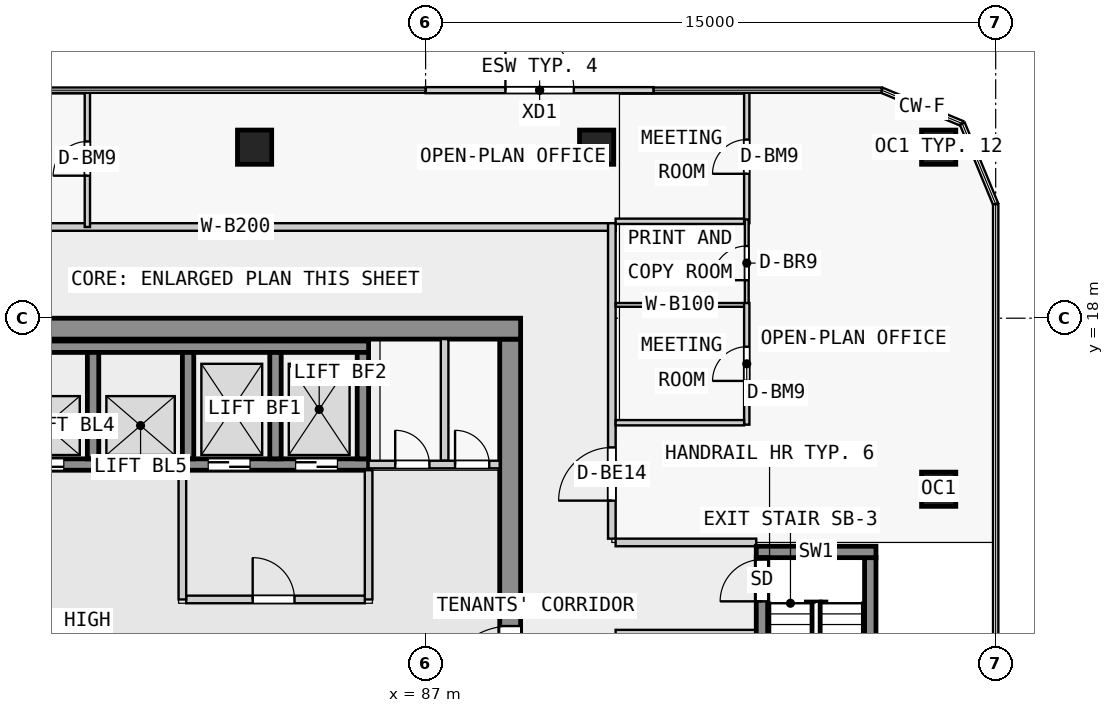
"""IFC4 building model, lengths in metres.
Left out: names, types, materials, properties, quantities, classifications, styles, units other than length and angle.
Written with IfcOpenShell. Run it as: python <this file> out.ifc"""

import sys

from ifc_helpers import new_model, si_unit, direction, frame, frame_2d, origin, origin_2d, place, context, subcontext, project, spatial, rectangle, extrude, element, fill, save


model = new_model("IFC4")
c1 = context("Model", 3, precision=1e-05, world=origin(), true_north=direction((0.0, 1.0)))
c2 = subcontext(c1, "Body", "Model", "MODEL_VIEW")
j1 = project(units=[si_unit("LENGTHUNIT", "METRE"), si_unit("PLANEANGLEUNIT", "RADIAN")], contexts=[c1])
p1 = place(None, origin())
s1 = spatial("IfcSite", under=j1, at=p1, CompositionType="ELEMENT")
p2 = place(p1, origin())
s2 = spatial("IfcBuilding", under=s1, at=p2, CompositionType="ELEMENT")
p3 = place(p2, frame((0.0, 0.0, 26.8)))
s3 = spatial("IfcBuildingStorey", under=s2, at=p3, CompositionType="ELEMENT", Elevation=26.8)
for number, where, z_axis, x_axis in (
    (1, (100.5, 13.5, 0.0), (0.0, 0.0, 1.0), (1.0, 0.0, 0.0)),
    (2, (100.5, 22.5, 0.0), (0.0, 0.0, 1.0), (1.0, 0.0, 0.0)),
    (3, (91.5, 22.5, 0.0), (0.0, 0.0, 1.0), (1.0, 0.0, 0.0)),
    (4, (82.5, 22.5, 0.0), (0.0, 0.0, 1.0), (1.0, 0.0, 0.0)),
):
    element("IfcColumn", number, at=place(p3, frame(where, z_axis=z_axis, x_axis=x_axis)), inside=s3, PredefinedType="COLUMN", context=c2, shape_type="SweptSolid", body=[
        extrude(rectangle(XDim=0.9, YDim=0.9, at=origin_2d()), origin(), (0.0, 0.0, 1.0), 3.5),
    ])
p4 = place(p3, frame((75.0, 17.725, 0.0), z_axis=(0.0, 0.0, 1.0), x_axis=(1.0, 0.0, 0.0)))
e5 = element("IfcWall", 5, at=p4, inside=s3, PredefinedType="SHEAR", context=c2, shape_type="SweptSolid", body=[
    extrude(rectangle(XDim=14.5, YDim=0.55, at=frame_2d((7.25, 0.0))), origin(), (0.0, 0.0, 1.0), 3.25),
])
p5 = place(p3, frame((89.225, 0.55, 0.0), z_axis=(0.0, 0.0, 1.0), x_axis=(0.0, 1.0, 0.0)))
e6 = element("IfcWall", 6, at=p5, inside=s3, PredefinedType="SHEAR", context=c2, shape_type="SweptSolid", body=[
    extrude(rectangle(XDim=16.9, YDim=0.55, at=frame_2d((8.45, 0.0))), origin(), (0.0, 0.0, 1.0), 3.25),
])
p6 = place(p5, frame((7.55, 0.0, 0.0)))
e7 = element("IfcOpeningElement", 7, at=p6, cuts=e6, PredefinedType="OPENING", context=c2, shape_type="SweptSolid", body=[
    extrude(rectangle(XDim=1.8, YDim=2.1, at=frame_2d((0.9, 1.05))), frame((0.0, 0.285, 0.0), z_axis=(0.0, -1.0, 0.0), x_axis=(1.0, 0.0, 0.0)), (0.0, 0.0, 1.0), 0.57),
])
p7 = place(p3, frame((75.53, 17.25, 0.0), z_axis=(0.0, 0.0, 1.0), x_axis=(1.0, 0.0, 0.0)))
e8 = element("IfcWall", 8, at=p7, inside=s3, PredefinedType="SHEAR", context=c2, shape_type="SweptSolid", body=[
    extrude(rectangle(XDim=9.97, YDim=0.3, at=frame_2d((4.985, 0.0))), origin(), (0.0, 0.0, 1.0), 3.25),
])
p8 = place(p3, frame((75.53, 14.15, 0.0), z_axis=(0.0, 0.0, 1.0), x_axis=(1.0, 0.0, 0.0)))
e9 = element("IfcWall", 9, at=p8, inside=s3, PredefinedType="SHEAR", context=c2, shape_type="SweptSolid", body=[
    extrude(rectangle(XDim=9.97, YDim=0.3, at=frame_2d((4.985, 0.0))), origin(), (0.0, 0.0, 1.0), 3.25),
])
p9 = place(p8, frame((0.85, 0.0, 0.0)))
e10 = element("IfcOpeningElement", 10, at=p9, cuts=e9, PredefinedType="OPENING", context=c2, shape_type="SweptSolid", body=[
    extrude(rectangle(XDim=1.1, YDim=2.1, at=frame_2d((0.55, 1.05))), frame((0.0, 0.16, 0.0), z_axis=(0.0, -1.0, 0.0), x_axis=(1.0, 0.0, 0.0)), (0.0, 0.0, 1.0), 0.32),
])
p10 = place(p8, frame((3.35, 0.0, 0.0)))
e11 = element("IfcOpeningElement", 11, at=p10, cuts=e9, PredefinedType="OPENING", context=c2, shape_type="SweptSolid", body=[
    extrude(rectangle(XDim=1.1, YDim=2.1, at=frame_2d((0.55, 1.05))), frame((0.0, 0.16, 0.0), z_axis=(0.0, -1.0, 0.0), x_axis=(1.0, 0.0, 0.0)), (0.0, 0.0, 1.0), 0.32),
])
p11 = place(p8, frame((5.75, 0.0, 0.0)))
e12 = element("IfcOpeningElement", 12, at=p11, cuts=e9, PredefinedType="OPENING", context=c2, shape_type="SweptSolid", body=[
    extrude(rectangle(XDim=1.1, YDim=2.1, at=frame_2d((0.55, 1.05))), frame((0.0, 0.16, 0.0), z_axis=(0.0, -1.0, 0.0), x_axis=(1.0, 0.0, 0.0)), (0.0, 0.0, 1.0), 0.32),
])
p12 = place(p8, frame((8.05, 0.0, 0.0)))
e13 = element("IfcOpeningElement", 13, at=p12, cuts=e9, PredefinedType="OPENING", context=c2, shape_type="SweptSolid", body=[
    extrude(rectangle(XDim=1.1, YDim=2.1, at=frame_2d((0.55, 1.05))), frame((0.0, 0.16, 0.0), z_axis=(0.0, -1.0, 0.0), x_axis=(1.0, 0.0, 0.0)), (0.0, 0.0, 1.0), 0.32),
])
for number, where, z_axis, x_axis in (
    (14, (78.25, 14.3, 0.0), (0.0, 0.0, 1.0), (0.0, 1.0, 0.0)),
    (15, (80.75, 14.3, 0.0), (0.0, 0.0, 1.0), (0.0, 1.0, 0.0)),
    (16, (83.05, 14.3, 0.0), (0.0, 0.0, 1.0), (0.0, 1.0, 0.0)),
    (17, (85.35, 14.3, 0.0), (0.0, 0.0, 1.0), (0.0, 1.0, 0.0)),
):
    element("IfcWall", number, at=place(p3, frame(where, z_axis=z_axis, x_axis=x_axis)), inside=s3, PredefinedType="SHEAR", context=c2, shape_type="SweptSolid", body=[
        extrude(rectangle(XDim=2.8, YDim=0.3, at=frame_2d((1.4, 0.0))), origin(), (0.0, 0.0, 1.0), 3.25),
    ])
p13 = place(p3, frame((95.85, 5.3, 0.0), z_axis=(0.0, 0.0, 1.0), x_axis=(0.0, 1.0, 0.0)))
e18 = element("IfcWall", 18, at=p13, inside=s3, PredefinedType="SHEAR", context=c2, shape_type="SweptSolid", body=[
    extrude(rectangle(XDim=6.4, YDim=0.3, at=frame_2d((3.2, 0.0))), origin(), (0.0, 0.0, 1.0), 3.25),
])
p14 = place(p13, frame((5.25, 0.0, 0.0)))
e19 = element("IfcOpeningElement", 19, at=p14, cuts=e18, PredefinedType="OPENING", context=c2, shape_type="SweptSolid", body=[
    extrude(rectangle(XDim=1.1, YDim=2.1, at=frame_2d((0.55, 1.05))), frame((0.0, 0.16, 0.0), z_axis=(0.0, -1.0, 0.0), x_axis=(1.0, 0.0, 0.0)), (0.0, 0.0, 1.0), 0.32),
])
p15 = place(p3, frame((98.7, 5.3, 0.0), z_axis=(0.0, 0.0, 1.0), x_axis=(0.0, 1.0, 0.0)))
e20 = element("IfcWall", 20, at=p15, inside=s3, PredefinedType="SHEAR", context=c2, shape_type="SweptSolid", body=[
    extrude(rectangle(XDim=6.4, YDim=0.3, at=frame_2d((3.2, 0.0))), origin(), (0.0, 0.0, 1.0), 3.25),
])
p16 = place(p3, frame((95.7, 11.85, 0.0), z_axis=(0.0, 0.0, 1.0), x_axis=(1.0, 0.0, 0.0)))
e21 = element("IfcWall", 21, at=p16, inside=s3, PredefinedType="SHEAR", context=c2, shape_type="SweptSolid", body=[
    extrude(rectangle(XDim=3.15, YDim=0.3, at=frame_2d((1.575, 0.0))), origin(), (0.0, 0.0, 1.0), 3.25),
])
p17 = place(p3, frame((87.0, 24.0, 0.0), z_axis=(0.0, 0.0, 1.0), x_axis=(1.0, 0.0, 0.0)))
e22 = element("IfcWall", 22, at=p17, inside=s3, PredefinedType="STANDARD", context=c2, shape_type="SweptSolid", body=[
    extrude(rectangle(XDim=6.0, YDim=0.16, at=frame_2d((3.0, 0.0))), origin(), (0.0, 0.0, 1.0), 3.25),
])
p18 = place(p17, frame((2.1, 0.0, 0.0)))
e23 = element("IfcOpeningElement", 23, at=p18, cuts=e22, PredefinedType="OPENING", context=c2, shape_type="SweptSolid", body=[
    extrude(rectangle(XDim=1.8, YDim=2.4, at=frame_2d((0.9, 1.2))), frame((0.0, 0.09, 0.0), z_axis=(0.0, -1.0, 0.0), x_axis=(1.0, 0.0, 0.0)), (0.0, 0.0, 1.0), 0.18),
])
p19 = place(p3, frame((80.6, 10.6, 0.0), z_axis=(0.0, 0.0, 1.0), x_axis=(0.0, 1.0, 0.0)))
e24 = element("IfcWall", 24, at=p19, inside=s3, PredefinedType="PARTITIONING", context=c2, shape_type="SweptSolid", body=[
    extrude(rectangle(XDim=3.4, YDim=0.2, at=frame_2d((1.7, 0.0))), origin(), (0.0, 0.0, 1.0), 3.25),
])
p20 = place(p3, frame((80.7, 10.6, 0.0), z_axis=(0.0, 0.0, 1.0), x_axis=(1.0, 0.0, 0.0)))
e25 = element("IfcWall", 25, at=p20, inside=s3, PredefinedType="PARTITIONING", context=c2, shape_type="SweptSolid", body=[
    extrude(rectangle(XDim=4.7, YDim=0.2, at=frame_2d((2.35, 0.0))), origin(), (0.0, 0.0, 1.0), 3.25),
])
p21 = place(p20, frame((1.75, 0.0, 0.0)))
e26 = element("IfcOpeningElement", 26, at=p21, cuts=e25, PredefinedType="OPENING", context=c2, shape_type="SweptSolid", body=[
    extrude(rectangle(XDim=1.1, YDim=2.1, at=frame_2d((0.55, 1.05))), frame((0.0, 0.11, 0.0), z_axis=(0.0, -1.0, 0.0), x_axis=(1.0, 0.0, 0.0)), (0.0, 0.0, 1.0), 0.22),
])
p22 = place(p3, frame((85.5, 10.6, 0.0), z_axis=(0.0, 0.0, 1.0), x_axis=(0.0, 1.0, 0.0)))
e27 = element("IfcWall", 27, at=p22, inside=s3, PredefinedType="PARTITIONING", context=c2, shape_type="SweptSolid", body=[
    extrude(rectangle(XDim=3.4, YDim=0.2, at=frame_2d((1.7, 0.0))), origin(), (0.0, 0.0, 1.0), 3.25),
])
p23 = place(p3, frame((85.5, 14.15, 0.0), z_axis=(0.0, 0.0, 1.0), x_axis=(1.0, 0.0, 0.0)))
e28 = element("IfcWall", 28, at=p23, inside=s3, PredefinedType="PARTITIONING", context=c2, shape_type="SweptSolid", body=[
    extrude(rectangle(XDim=3.45, YDim=0.2, at=frame_2d((1.725, 0.0))), origin(), (0.0, 0.0, 1.0), 3.25),
])
p24 = place(p23, frame((0.7, 0.0, 0.0)))
e29 = element("IfcOpeningElement", 29, at=p24, cuts=e28, PredefinedType="OPENING", context=c2, shape_type="SweptSolid", body=[
    extrude(rectangle(XDim=0.9, YDim=2.1, at=frame_2d((0.45, 1.05))), frame((0.0, 0.11, 0.0), z_axis=(0.0, -1.0, 0.0), x_axis=(1.0, 0.0, 0.0)), (0.0, 0.0, 1.0), 0.22),
])
p25 = place(p23, frame((2.275, 0.0, 0.0)))
e30 = element("IfcOpeningElement", 30, at=p25, cuts=e28, PredefinedType="OPENING", context=c2, shape_type="SweptSolid", body=[
    extrude(rectangle(XDim=0.9, YDim=2.1, at=frame_2d((0.45, 1.05))), frame((0.0, 0.11, 0.0), z_axis=(0.0, -1.0, 0.0), x_axis=(1.0, 0.0, 0.0)), (0.0, 0.0, 1.0), 0.22),
])
p26 = place(p3, frame((87.5, 14.25, 0.0), z_axis=(0.0, 0.0, 1.0), x_axis=(0.0, 1.0, 0.0)))
e31 = element("IfcWall", 31, at=p26, inside=s3, PredefinedType="PARTITIONING", context=c2, shape_type="SweptSolid", body=[
    extrude(rectangle(XDim=3.2, YDim=0.2, at=frame_2d((1.6, 0.0))), origin(), (0.0, 0.0, 1.0), 3.25),
])
p27 = place(p3, frame((72.0, 20.4, 0.0), z_axis=(0.0, 0.0, 1.0), x_axis=(1.0, 0.0, 0.0)))
e32 = element("IfcWall", 32, at=p27, inside=s3, PredefinedType="PARTITIONING", context=c2, shape_type="SweptSolid", body=[
    extrude(rectangle(XDim=20.0, YDim=0.2, at=frame_2d((10.0, 0.0))), origin(), (0.0, 0.0, 1.0), 3.25),
])
p28 = place(p3, frame((91.9, 12.2, 0.0), z_axis=(0.0, 0.0, 1.0), x_axis=(0.0, 1.0, 0.0)))
e33 = element("IfcWall", 33, at=p28, inside=s3, PredefinedType="PARTITIONING", context=c2, shape_type="SweptSolid", body=[
    extrude(rectangle(XDim=8.3, YDim=0.2, at=frame_2d((4.15, 0.0))), origin(), (0.0, 0.0, 1.0), 3.25),
])
p29 = place(p28, frame((1.0, 0.0, 0.0)))
e34 = element("IfcOpeningElement", 34, at=p29, cuts=e33, PredefinedType="OPENING", context=c2, shape_type="SweptSolid", body=[
    extrude(rectangle(XDim=1.4, YDim=2.4, at=frame_2d((0.7, 1.2))), frame((0.0, 0.11, 0.0), z_axis=(0.0, -1.0, 0.0), x_axis=(1.0, 0.0, 0.0)), (0.0, 0.0, 1.0), 0.22),
])
for number, where, z_axis, x_axis in (
    (35, (92.0, 9.7, 0.0), (0.0, 0.0, 1.0), (1.0, 0.0, 0.0)),
    (36, (92.0, 12.1, 0.0), (0.0, 0.0, 1.0), (1.0, 0.0, 0.0)),
):
    element("IfcWall", number, at=place(p3, frame(where, z_axis=z_axis, x_axis=x_axis)), inside=s3, PredefinedType="PARTITIONING", context=c2, shape_type="SweptSolid", body=[
        extrude(rectangle(XDim=3.7, YDim=0.2, at=frame_2d((1.85, 0.0))), origin(), (0.0, 0.0, 1.0), 3.25),
    ])
p30 = place(p3, frame((95.45, 20.5, 0.0), z_axis=(0.0, 0.0, 1.0), x_axis=(0.0, 1.0, 0.0)))
e37 = element("IfcWall", 37, at=p30, inside=s3, PredefinedType="PARTITIONING", context=c2, shape_type="SweptSolid", body=[
    extrude(rectangle(XDim=3.5, YDim=0.14, at=frame_2d((1.75, 0.0))), origin(), (0.0, 0.0, 1.0), 3.25),
])
p31 = place(p30, frame((1.3, 0.0, 0.0)))
e38 = element("IfcOpeningElement", 38, at=p31, cuts=e37, PredefinedType="OPENING", context=c2, shape_type="SweptSolid", body=[
    extrude(rectangle(XDim=0.9, YDim=2.4, at=frame_2d((0.45, 1.2))), frame((0.0, 0.08, 0.0), z_axis=(0.0, -1.0, 0.0), x_axis=(1.0, 0.0, 0.0)), (0.0, 0.0, 1.0), 0.16),
])
p32 = place(p3, frame((92.0, 20.55, 0.0), z_axis=(0.0, 0.0, 1.0), x_axis=(1.0, 0.0, 0.0)))
e39 = element("IfcWall", 39, at=p32, inside=s3, PredefinedType="PARTITIONING", context=c2, shape_type="SweptSolid", body=[
    extrude(rectangle(XDim=3.38, YDim=0.14, at=frame_2d((1.69, 0.0))), origin(), (0.0, 0.0, 1.0), 3.25),
])
p33 = place(p3, frame((95.45, 18.3, 0.0), z_axis=(0.0, 0.0, 1.0), x_axis=(0.0, 1.0, 0.0)))
e40 = element("IfcWall", 40, at=p33, inside=s3, PredefinedType="PARTITIONING", context=c2, shape_type="SweptSolid", body=[
    extrude(rectangle(XDim=2.3, YDim=0.1, at=frame_2d((1.15, 0.0))), origin(), (0.0, 0.0, 1.0), 3.25),
])
p34 = place(p33, frame((0.7, 0.0, 0.0)))
e41 = element("IfcOpeningElement", 41, at=p34, cuts=e40, PredefinedType="OPENING", context=c2, shape_type="SweptSolid", body=[
    extrude(rectangle(XDim=0.9, YDim=2.1, at=frame_2d((0.45, 1.05))), frame((0.0, 0.06, 0.0), z_axis=(0.0, -1.0, 0.0), x_axis=(1.0, 0.0, 0.0)), (0.0, 0.0, 1.0), 0.12),
])
p35 = place(p3, frame((92.0, 18.35, 0.0), z_axis=(0.0, 0.0, 1.0), x_axis=(1.0, 0.0, 0.0)))
e42 = element("IfcWall", 42, at=p35, inside=s3, PredefinedType="PARTITIONING", context=c2, shape_type="SweptSolid", body=[
    extrude(rectangle(XDim=3.4, YDim=0.1, at=frame_2d((1.7, 0.0))), origin(), (0.0, 0.0, 1.0), 3.25),
])
p36 = place(p3, frame((95.45, 15.2, 0.0), z_axis=(0.0, 0.0, 1.0), x_axis=(0.0, 1.0, 0.0)))
e43 = element("IfcWall", 43, at=p36, inside=s3, PredefinedType="PARTITIONING", context=c2, shape_type="SweptSolid", body=[
    extrude(rectangle(XDim=3.2, YDim=0.14, at=frame_2d((1.6, 0.0))), origin(), (0.0, 0.0, 1.0), 3.25),
])
p37 = place(p36, frame((1.15, 0.0, 0.0)))
e44 = element("IfcOpeningElement", 44, at=p37, cuts=e43, PredefinedType="OPENING", context=c2, shape_type="SweptSolid", body=[
    extrude(rectangle(XDim=0.9, YDim=2.4, at=frame_2d((0.45, 1.2))), frame((0.0, 0.08, 0.0), z_axis=(0.0, -1.0, 0.0), x_axis=(1.0, 0.0, 0.0)), (0.0, 0.0, 1.0), 0.16),
])
p38 = place(p3, frame((92.0, 15.25, 0.0), z_axis=(0.0, 0.0, 1.0), x_axis=(1.0, 0.0, 0.0)))
e45 = element("IfcWall", 45, at=p38, inside=s3, PredefinedType="PARTITIONING", context=c2, shape_type="SweptSolid", body=[
    extrude(rectangle(XDim=3.38, YDim=0.14, at=frame_2d((1.69, 0.0))), origin(), (0.0, 0.0, 1.0), 3.25),
])
p39 = place(p3, frame((78.1, 20.4, 0.0), z_axis=(0.0, 0.0, 1.0), x_axis=(0.0, 1.0, 0.0)))
e46 = element("IfcWall", 46, at=p39, inside=s3, PredefinedType="PARTITIONING", context=c2, shape_type="SweptSolid", body=[
    extrude(rectangle(XDim=3.6, YDim=0.14, at=frame_2d((1.8, 0.0))), origin(), (0.0, 0.0, 1.0), 3.25),
])
p40 = place(p39, frame((1.35, 0.0, 0.0)))
e47 = element("IfcOpeningElement", 47, at=p40, cuts=e46, PredefinedType="OPENING", context=c2, shape_type="SweptSolid", body=[
    extrude(rectangle(XDim=0.9, YDim=2.4, at=frame_2d((0.45, 1.2))), frame((0.0, 0.08, 0.0), z_axis=(0.0, -1.0, 0.0), x_axis=(1.0, 0.0, 0.0)), (0.0, 0.0, 1.0), 0.16),
])
p41 = place(p18, origin())
e48 = element("IfcDoor", 48, at=p41, inside=s3, OperationType="SINGLE_SWING_LEFT", PredefinedType="DOOR", context=c2, shape_type="SweptSolid", body=[
    extrude(rectangle(XDim=1.8, YDim=2.4, at=frame_2d((0.9, 1.2))), frame((0.0, 0.025, 0.0), z_axis=(0.0, -1.0, 0.0), x_axis=(1.0, 0.0, 0.0)), (0.0, 0.0, 1.0), 0.05),
])
fill(e23, e48)
p42 = place(p21, origin())
e49 = element("IfcDoor", 49, at=p42, inside=s3, OperationType="SINGLE_SWING_LEFT", PredefinedType="DOOR", context=c2, shape_type="SweptSolid", body=[
    extrude(rectangle(XDim=1.1, YDim=2.1, at=frame_2d((0.55, 1.05))), frame((0.0, 0.025, 0.0), z_axis=(0.0, -1.0, 0.0), x_axis=(1.0, 0.0, 0.0)), (0.0, 0.0, 1.0), 0.05),
])
fill(e26, e49)
p43 = place(p9, origin())
e50 = element("IfcDoor", 50, at=p43, inside=s3, OperationType="DOUBLE_DOOR_SLIDING", PredefinedType="DOOR", context=c2, shape_type="SweptSolid", body=[
    extrude(rectangle(XDim=1.1, YDim=2.1, at=frame_2d((0.55, 1.05))), frame((0.0, 0.025, 0.0), z_axis=(0.0, -1.0, 0.0), x_axis=(1.0, 0.0, 0.0)), (0.0, 0.0, 1.0), 0.05),
])
fill(e10, e50)
p44 = place(p10, origin())
e51 = element("IfcDoor", 51, at=p44, inside=s3, OperationType="DOUBLE_DOOR_SLIDING", PredefinedType="DOOR", context=c2, shape_type="SweptSolid", body=[
    extrude(rectangle(XDim=1.1, YDim=2.1, at=frame_2d((0.55, 1.05))), frame((0.0, 0.025, 0.0), z_axis=(0.0, -1.0, 0.0), x_axis=(1.0, 0.0, 0.0)), (0.0, 0.0, 1.0), 0.05),
])
fill(e11, e51)
p45 = place(p11, origin())
e52 = element("IfcDoor", 52, at=p45, inside=s3, OperationType="DOUBLE_DOOR_SLIDING", PredefinedType="DOOR", context=c2, shape_type="SweptSolid", body=[
    extrude(rectangle(XDim=1.1, YDim=2.1, at=frame_2d((0.55, 1.05))), frame((0.0, 0.025, 0.0), z_axis=(0.0, -1.0, 0.0), x_axis=(1.0, 0.0, 0.0)), (0.0, 0.0, 1.0), 0.05),
])
fill(e12, e52)
p46 = place(p12, origin())
e53 = element("IfcDoor", 53, at=p46, inside=s3, OperationType="DOUBLE_DOOR_SLIDING", PredefinedType="DOOR", context=c2, shape_type="SweptSolid", body=[
    extrude(rectangle(XDim=1.1, YDim=2.1, at=frame_2d((0.55, 1.05))), frame((0.0, 0.025, 0.0), z_axis=(0.0, -1.0, 0.0), x_axis=(1.0, 0.0, 0.0)), (0.0, 0.0, 1.0), 0.05),
])
fill(e13, e53)
p47 = place(p14, origin())
e54 = element("IfcDoor", 54, at=p47, inside=s3, OperationType="SINGLE_SWING_LEFT", PredefinedType="DOOR", context=c2, shape_type="SweptSolid", body=[
    extrude(rectangle(XDim=1.1, YDim=2.1, at=frame_2d((0.55, 1.05))), frame((0.0, 0.025, 0.0), z_axis=(0.0, -1.0, 0.0), x_axis=(1.0, 0.0, 0.0)), (0.0, 0.0, 1.0), 0.05),
])
fill(e19, e54)
p48 = place(p6, origin())
e55 = element("IfcDoor", 55, at=p48, inside=s3, OperationType="DOUBLE_DOOR_SINGLE_SWING", PredefinedType="DOOR", context=c2, shape_type="SweptSolid", body=[
    extrude(rectangle(XDim=1.8, YDim=2.1, at=frame_2d((0.9, 1.05))), frame((0.0, 0.025, 0.0), z_axis=(0.0, -1.0, 0.0), x_axis=(1.0, 0.0, 0.0)), (0.0, 0.0, 1.0), 0.05),
])
fill(e7, e55)
p49 = place(p24, origin())
e56 = element("IfcDoor", 56, at=p49, inside=s3, OperationType="SINGLE_SWING_LEFT", PredefinedType="DOOR", context=c2, shape_type="SweptSolid", body=[
    extrude(rectangle(XDim=0.9, YDim=2.1, at=frame_2d((0.45, 1.05))), frame((0.0, 0.025, 0.0), z_axis=(0.0, -1.0, 0.0), x_axis=(1.0, 0.0, 0.0)), (0.0, 0.0, 1.0), 0.05),
])
fill(e29, e56)
p50 = place(p25, origin())
e57 = element("IfcDoor", 57, at=p50, inside=s3, OperationType="SINGLE_SWING_LEFT", PredefinedType="DOOR", context=c2, shape_type="SweptSolid", body=[
    extrude(rectangle(XDim=0.9, YDim=2.1, at=frame_2d((0.45, 1.05))), frame((0.0, 0.025, 0.0), z_axis=(0.0, -1.0, 0.0), x_axis=(1.0, 0.0, 0.0)), (0.0, 0.0, 1.0), 0.05),
])
fill(e30, e57)
p51 = place(p29, origin())
e58 = element("IfcDoor", 58, at=p51, inside=s3, OperationType="DOUBLE_DOOR_SINGLE_SWING", PredefinedType="DOOR", context=c2, shape_type="SweptSolid", body=[
    extrude(rectangle(XDim=1.4, YDim=2.4, at=frame_2d((0.7, 1.2))), frame((0.0, 0.025, 0.0), z_axis=(0.0, -1.0, 0.0), x_axis=(1.0, 0.0, 0.0)), (0.0, 0.0, 1.0), 0.05),
])
fill(e34, e58)
p52 = place(p31, origin())
e59 = element("IfcDoor", 59, at=p52, inside=s3, OperationType="SINGLE_SWING_LEFT", PredefinedType="DOOR", context=c2, shape_type="SweptSolid", body=[
    extrude(rectangle(XDim=0.9, YDim=2.4, at=frame_2d((0.45, 1.2))), frame((0.0, 0.025, 0.0), z_axis=(0.0, -1.0, 0.0), x_axis=(1.0, 0.0, 0.0)), (0.0, 0.0, 1.0), 0.05),
])
fill(e38, e59)
p53 = place(p34, origin())
e60 = element("IfcDoor", 60, at=p53, inside=s3, OperationType="SINGLE_SWING_LEFT", PredefinedType="DOOR", context=c2, shape_type="SweptSolid", body=[
    extrude(rectangle(XDim=0.9, YDim=2.1, at=frame_2d((0.45, 1.05))), frame((0.0, 0.025, 0.0), z_axis=(0.0, -1.0, 0.0), x_axis=(1.0, 0.0, 0.0)), (0.0, 0.0, 1.0), 0.05),
])
fill(e41, e60)
p54 = place(p37, origin())
e61 = element("IfcDoor", 61, at=p54, inside=s3, OperationType="SINGLE_SWING_LEFT", PredefinedType="DOOR", context=c2, shape_type="SweptSolid", body=[
    extrude(rectangle(XDim=0.9, YDim=2.4, at=frame_2d((0.45, 1.2))), frame((0.0, 0.025, 0.0), z_axis=(0.0, -1.0, 0.0), x_axis=(1.0, 0.0, 0.0)), (0.0, 0.0, 1.0), 0.05),
])
fill(e44, e61)
p55 = place(p40, origin())
e62 = element("IfcDoor", 62, at=p55, inside=s3, OperationType="SINGLE_SWING_LEFT", PredefinedType="DOOR", context=c2, shape_type="SweptSolid", body=[
    extrude(rectangle(XDim=0.9, YDim=2.4, at=frame_2d((0.45, 1.2))), frame((0.0, 0.025, 0.0), z_axis=(0.0, -1.0, 0.0), x_axis=(1.0, 0.0, 0.0)), (0.0, 0.0, 1.0), 0.05),
])
fill(e47, e62)
save(model, sys.argv[1])
